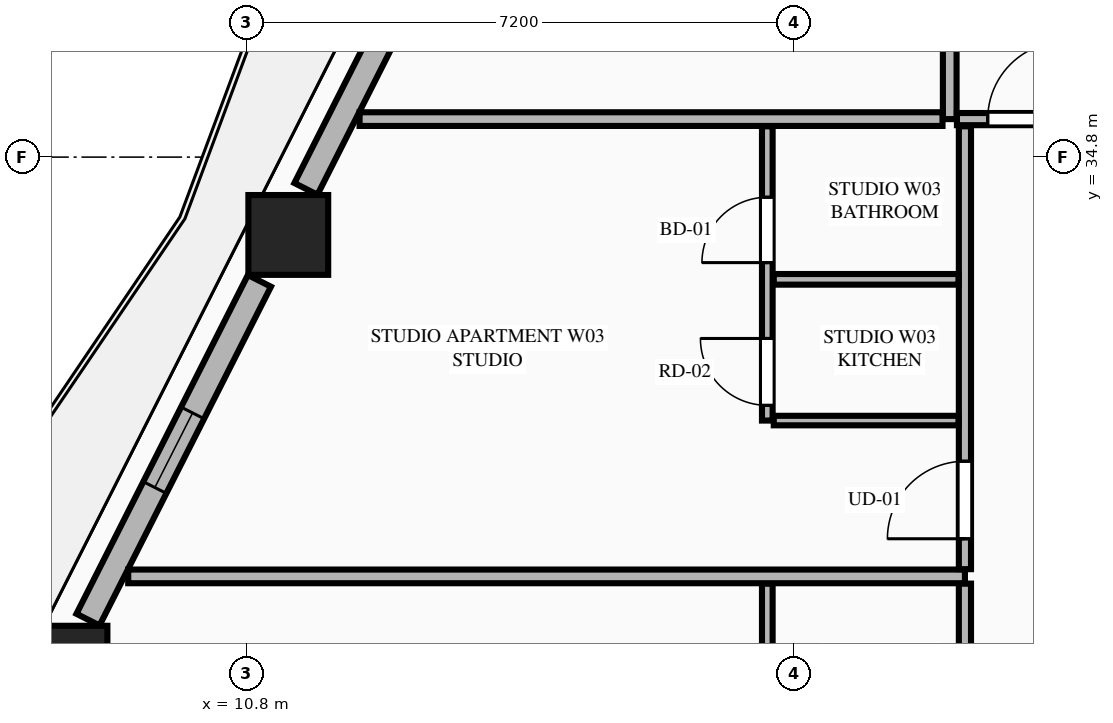
"""IFC4 building model, lengths in metres.
Left out: names, types, materials, properties, quantities, classifications, styles, units other than length and angle.
Written with IfcOpenShell. Run it as: python <this file> out.ifc"""

import sys

from ifc_helpers import new_model, si_unit, direction, frame, frame_2d, origin, origin_2d, place, context, subcontext, project, spatial, rectangle, extrude, element, fill, save


model = new_model("IFC4")
c1 = context("Model", 3, precision=1e-05, world=origin(), true_north=direction((0.0, 1.0)))
c2 = subcontext(c1, "Body", "Model", "MODEL_VIEW")
j1 = project(units=[si_unit("LENGTHUNIT", "METRE"), si_unit("PLANEANGLEUNIT", "RADIAN")], contexts=[c1])
p1 = place(None, origin())
s1 = spatial("IfcSite", under=j1, at=p1, CompositionType="ELEMENT")
p2 = place(p1, origin())
s2 = spatial("IfcBuilding", under=s1, at=p2, CompositionType="ELEMENT")
p3 = place(p2, frame((0.0, 0.0, 137.45)))
s3 = spatial("IfcBuildingStorey", under=s2, at=p3, CompositionType="ELEMENT", Elevation=137.45)
for number, where, z_axis, x_axis in (
    (1, (11.348, 33.776, 0.0), (0.0, 0.0, 1.0), (1.0, 0.0, 0.0)),
    (2, (8.443, 28.109, 0.0), (0.0, 0.0, 1.0), (1.0, 0.0, 0.0)),
):
    element("IfcColumn", number, at=place(p3, frame(where, z_axis=z_axis, x_axis=x_axis)), inside=s3, PredefinedType="COLUMN", context=c2, shape_type="SweptSolid", body=[
        extrude(rectangle(XDim=1.05, YDim=1.05, at=origin_2d()), origin(), (0.0, 0.0, 1.0), 3.55),
    ])
p4 = place(p3, frame((13.937, 39.039, 0.0), z_axis=(0.0, 0.0, 1.0), x_axis=(-0.451567731634, -0.892236842855, 0.0)))
e3 = element("IfcWall", 3, at=p4, inside=s3, PredefinedType="STANDARD", context=c2, shape_type="SweptSolid", body=[
    extrude(rectangle(XDim=5.219, YDim=0.34, at=frame_2d((2.61, 0.0))), origin(), (0.0, 0.0, 1.0), 2.797),
])
p5 = place(p4, frame((1.42, 0.0, 0.0)))
e4 = element("IfcOpeningElement", 4, at=p5, cuts=e3, PredefinedType="OPENING", context=c2, shape_type="SweptSolid", body=[
    extrude(rectangle(XDim=1.1, YDim=2.25, at=frame_2d((0.55, 1.125))), frame((0.0, 0.18, 0.0), z_axis=(0.0, -1.0, 0.0), x_axis=(1.0, 0.0, 0.0)), (0.0, 0.0, 1.0), 0.36),
])
p6 = place(p3, frame((10.968, 33.172, 0.0), z_axis=(0.0, 0.0, 1.0), x_axis=(-0.451470533039, -0.892286029139, 0.0)))
e5 = element("IfcWall", 5, at=p6, inside=s3, PredefinedType="STANDARD", context=c2, shape_type="SweptSolid", body=[
    extrude(rectangle(XDim=4.995, YDim=0.34, at=frame_2d((2.498, 0.0))), origin(), (0.0, 0.0, 1.0), 2.797),
])
p7 = place(p6, frame((1.947, 0.0, 0.75)))
e6 = element("IfcOpeningElement", 6, at=p7, cuts=e5, PredefinedType="OPENING", context=c2, shape_type="SweptSolid", body=[
    extrude(rectangle(XDim=1.1, YDim=1.897, at=frame_2d((0.55, 0.948))), frame((0.0, 0.18, 0.0), z_axis=(0.0, -1.0, 0.0), x_axis=(1.0, 0.0, 0.0)), (0.0, 0.0, 1.0), 0.36),
])
p8 = place(p3, frame((20.05, 35.3, 0.0), z_axis=(0.0, 0.0, 1.0), x_axis=(0.0, 1.0, 0.0)))
e7 = element("IfcWall", 7, at=p8, inside=s3, PredefinedType="PARTITIONING", context=c2, shape_type="SweptSolid", body=[
    extrude(rectangle(XDim=12.195, YDim=0.18, at=frame_2d((6.098, 0.0))), origin(), (0.0, 0.0, 1.0), 3.34),
])
p9 = place(p3, frame((20.145, 35.3, 0.0), z_axis=(0.0, 0.0, 1.0), x_axis=(1.0, 0.0, 0.0)))
e8 = element("IfcWall", 8, at=p9, inside=s3, PredefinedType="PARTITIONING", context=c2, shape_type="SweptSolid", body=[
    extrude(rectangle(XDim=8.328, YDim=0.16, at=frame_2d((4.164, 0.0))), origin(), (0.0, 0.0, 1.0), 3.34),
])
p10 = place(p9, frame((0.405, 0.0, 0.0)))
e9 = element("IfcOpeningElement", 9, at=p10, cuts=e8, PredefinedType="OPENING", context=c2, shape_type="SweptSolid", body=[
    extrude(rectangle(XDim=1.02, YDim=2.25, at=frame_2d((0.51, 1.125))), frame((0.0, 0.09, 0.0), z_axis=(0.0, -1.0, 0.0), x_axis=(1.0, 0.0, 0.0)), (0.0, 0.0, 1.0), 0.18),
])
p11 = place(p3, frame((12.286, 35.3, 0.0), z_axis=(0.0, 0.0, 1.0), x_axis=(1.0, 0.0, 0.0)))
e10 = element("IfcWall", 10, at=p11, inside=s3, PredefinedType="PARTITIONING", context=c2, shape_type="SweptSolid", body=[
    extrude(rectangle(XDim=7.669, YDim=0.18, at=frame_2d((3.834, 0.0))), origin(), (0.0, 0.0, 1.0), 3.34),
])
p12 = place(p3, frame((20.25, 22.987, 0.0), z_axis=(0.0, 0.0, 1.0), x_axis=(0.0, 1.0, 0.0)))
e11 = element("IfcWall", 11, at=p12, inside=s3, PredefinedType="PARTITIONING", context=c2, shape_type="SweptSolid", body=[
    extrude(rectangle(XDim=6.202, YDim=0.16, at=frame_2d((3.101, 0.0))), origin(), (0.0, 0.0, 1.0), 3.34),
])
p13 = place(p12, frame((0.4, 0.0, 0.0)))
e12 = element("IfcOpeningElement", 12, at=p13, cuts=e11, PredefinedType="OPENING", context=c2, shape_type="SweptSolid", body=[
    extrude(rectangle(XDim=1.02, YDim=2.25, at=frame_2d((0.51, 1.125))), frame((0.0, 0.09, 0.0), z_axis=(0.0, -1.0, 0.0), x_axis=(1.0, 0.0, 0.0)), (0.0, 0.0, 1.0), 0.18),
])
p14 = place(p3, frame((17.65, 24.942, 0.0), z_axis=(0.0, 0.0, 1.0), x_axis=(0.0, 1.0, 0.0)))
e13 = element("IfcWall", 13, at=p14, inside=s3, PredefinedType="PLUMBINGWALL", context=c2, shape_type="SweptSolid", body=[
    extrude(rectangle(XDim=4.247, YDim=0.14, at=frame_2d((2.124, 0.0))), origin(), (0.0, 0.0, 1.0), 3.34),
])
p15 = place(p14, frame((2.259, 0.0, 0.0)))
e14 = element("IfcOpeningElement", 14, at=p15, cuts=e13, PredefinedType="OPENING", context=c2, shape_type="SweptSolid", body=[
    extrude(rectangle(XDim=0.86, YDim=2.1, at=frame_2d((0.43, 1.05))), frame((0.0, 0.08, 0.0), z_axis=(0.0, -1.0, 0.0), x_axis=(1.0, 0.0, 0.0)), (0.0, 0.0, 1.0), 0.16),
])
p16 = place(p14, frame((0.2, 0.0, 0.0)))
e15 = element("IfcOpeningElement", 15, at=p16, cuts=e13, PredefinedType="OPENING", context=c2, shape_type="SweptSolid", body=[
    extrude(rectangle(XDim=0.88, YDim=2.15, at=frame_2d((0.44, 1.075))), frame((0.0, 0.08, 0.0), z_axis=(0.0, -1.0, 0.0), x_axis=(1.0, 0.0, 0.0)), (0.0, 0.0, 1.0), 0.16),
])
p17 = place(p3, frame((9.242, 29.284, 0.0), z_axis=(0.0, 0.0, 1.0), x_axis=(1.0, 0.0, 0.0)))
e16 = element("IfcWall", 16, at=p17, inside=s3, PredefinedType="PARTITIONING", context=c2, shape_type="SweptSolid", body=[
    extrude(rectangle(XDim=11.008, YDim=0.18, at=frame_2d((5.504, 0.0))), origin(), (0.0, 0.0, 1.0), 3.34),
])
p18 = place(p3, frame((20.25, 29.379, 0.0), z_axis=(0.0, 0.0, 1.0), x_axis=(0.0, 1.0, 0.0)))
e17 = element("IfcWall", 17, at=p18, inside=s3, PredefinedType="PARTITIONING", context=c2, shape_type="SweptSolid", body=[
    extrude(rectangle(XDim=5.826, YDim=0.16, at=frame_2d((2.913, 0.0))), origin(), (0.0, 0.0, 1.0), 3.34),
])
p19 = place(p18, frame((0.4, 0.0, 0.0)))
e18 = element("IfcOpeningElement", 18, at=p19, cuts=e17, PredefinedType="OPENING", context=c2, shape_type="SweptSolid", body=[
    extrude(rectangle(XDim=1.02, YDim=2.25, at=frame_2d((0.51, 1.125))), frame((0.0, 0.09, 0.0), z_axis=(0.0, -1.0, 0.0), x_axis=(1.0, 0.0, 0.0)), (0.0, 0.0, 1.0), 0.18),
])
p20 = place(p3, frame((17.735, 31.334, 0.0), z_axis=(0.0, 0.0, 1.0), x_axis=(1.0, 0.0, 0.0)))
e19 = element("IfcWall", 19, at=p20, inside=s3, PredefinedType="PARTITIONING", context=c2, shape_type="SweptSolid", body=[
    extrude(rectangle(XDim=2.43, YDim=0.125, at=frame_2d((1.215, 0.0))), origin(), (0.0, 0.0, 1.0), 3.34),
])
p21 = place(p3, frame((17.65, 31.334, 0.0), z_axis=(0.0, 0.0, 1.0), x_axis=(0.0, 1.0, 0.0)))
e20 = element("IfcWall", 20, at=p21, inside=s3, PredefinedType="PLUMBINGWALL", context=c2, shape_type="SweptSolid", body=[
    extrude(rectangle(XDim=3.871, YDim=0.14, at=frame_2d((1.936, 0.0))), origin(), (0.0, 0.0, 1.0), 3.34),
])
p22 = place(p21, frame((2.078, 0.0, 0.0)))
e21 = element("IfcOpeningElement", 21, at=p22, cuts=e20, PredefinedType="OPENING", context=c2, shape_type="SweptSolid", body=[
    extrude(rectangle(XDim=0.86, YDim=2.1, at=frame_2d((0.43, 1.05))), frame((0.0, 0.08, 0.0), z_axis=(0.0, -1.0, 0.0), x_axis=(1.0, 0.0, 0.0)), (0.0, 0.0, 1.0), 0.16),
])
p23 = place(p21, frame((0.2, 0.0, 0.0)))
e22 = element("IfcOpeningElement", 22, at=p23, cuts=e20, PredefinedType="OPENING", context=c2, shape_type="SweptSolid", body=[
    extrude(rectangle(XDim=0.88, YDim=2.15, at=frame_2d((0.44, 1.075))), frame((0.0, 0.08, 0.0), z_axis=(0.0, -1.0, 0.0), x_axis=(1.0, 0.0, 0.0)), (0.0, 0.0, 1.0), 0.16),
])
p24 = place(p3, frame((17.735, 33.192, 0.0), z_axis=(0.0, 0.0, 1.0), x_axis=(1.0, 0.0, 0.0)))
e23 = element("IfcWall", 23, at=p24, inside=s3, PredefinedType="PLUMBINGWALL", context=c2, shape_type="SweptSolid", body=[
    extrude(rectangle(XDim=2.43, YDim=0.14, at=frame_2d((1.215, 0.0))), origin(), (0.0, 0.0, 1.0), 2.722),
])
p25 = place(p7, origin())
e24 = element("IfcWindow", 24, at=p25, inside=s3, PartitioningType="SINGLE_PANEL", PredefinedType="WINDOW", context=c2, shape_type="SweptSolid", body=[
    extrude(rectangle(XDim=1.1, YDim=1.897, at=frame_2d((0.55, 0.948))), frame((0.0, 0.03, 0.0), z_axis=(0.0, -1.0, 0.0), x_axis=(1.0, 0.0, 0.0)), (0.0, 0.0, 1.0), 0.06),
])
fill(e6, e24)
p26 = place(p10, origin())
e25 = element("IfcDoor", 25, at=p26, inside=s3, OperationType="SINGLE_SWING_RIGHT", PredefinedType="DOOR", context=c2, shape_type="SweptSolid", body=[
    extrude(rectangle(XDim=1.02, YDim=2.25, at=frame_2d((0.51, 1.125))), frame((0.0, 0.025, 0.0), z_axis=(0.0, -1.0, 0.0), x_axis=(1.0, 0.0, 0.0)), (0.0, 0.0, 1.0), 0.05),
])
fill(e9, e25)
p27 = place(p22, origin())
e26 = element("IfcDoor", 26, at=p27, inside=s3, OperationType="SINGLE_SWING_LEFT", PredefinedType="DOOR", context=c2, shape_type="SweptSolid", body=[
    extrude(rectangle(XDim=0.86, YDim=2.1, at=frame_2d((0.43, 1.05))), frame((0.0, 0.025, 0.0), z_axis=(0.0, -1.0, 0.0), x_axis=(1.0, 0.0, 0.0)), (0.0, 0.0, 1.0), 0.05),
])
fill(e21, e26)
p28 = place(p19, origin())
e27 = element("IfcDoor", 27, at=p28, inside=s3, OperationType="SINGLE_SWING_LEFT", PredefinedType="DOOR", context=c2, shape_type="SweptSolid", body=[
    extrude(rectangle(XDim=1.02, YDim=2.25, at=frame_2d((0.51, 1.125))), frame((0.0, 0.025, 0.0), z_axis=(0.0, -1.0, 0.0), x_axis=(1.0, 0.0, 0.0)), (0.0, 0.0, 1.0), 0.05),
])
fill(e18, e27)
p29 = place(p23, origin())
e28 = element("IfcDoor", 28, at=p29, inside=s3, OperationType="SINGLE_SWING_RIGHT", PredefinedType="DOOR", context=c2, shape_type="SweptSolid", body=[
    extrude(rectangle(XDim=0.88, YDim=2.15, at=frame_2d((0.44, 1.075))), frame((0.0, 0.025, 0.0), z_axis=(0.0, -1.0, 0.0), x_axis=(1.0, 0.0, 0.0)), (0.0, 0.0, 1.0), 0.05),
])
fill(e22, e28)
save(model, sys.argv[1])
